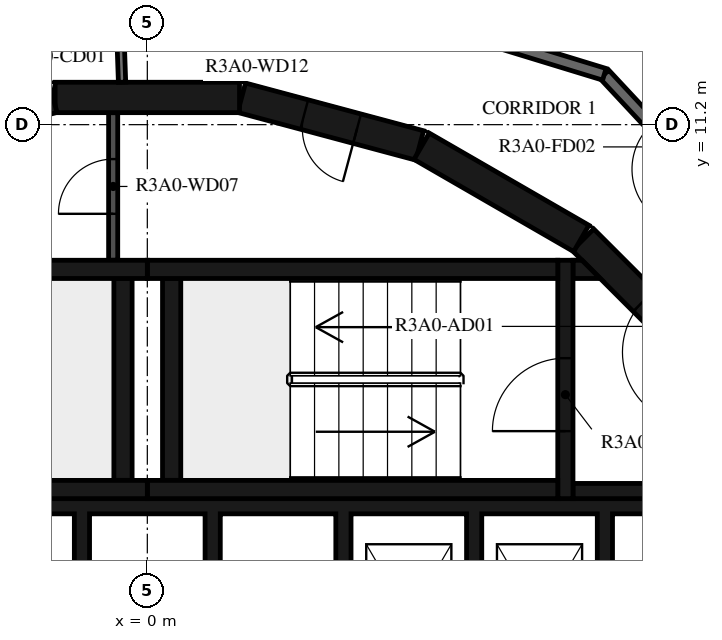
"""IFC4 building model, lengths in metres.
Left out: names, types, materials, properties, quantities, classifications, styles, units other than length and angle.
Written with IfcOpenShell. Run it as: python <this file> out.ifc"""

import sys

from ifc_helpers import new_model, si_unit, direction, frame, frame_2d, origin, place, context, subcontext, project, spatial, polyline, rectangle, outline, extrude, element, fill, save


model = new_model("IFC4")
c1 = context("Model", 3, precision=1e-05, world=origin(), true_north=direction((0.0, 1.0)))
c2 = subcontext(c1, "Body", "Model", "MODEL_VIEW")
j1 = project(units=[si_unit("LENGTHUNIT", "METRE"), si_unit("PLANEANGLEUNIT", "RADIAN")], contexts=[c1])
p1 = place(None, origin())
s1 = spatial("IfcSite", under=j1, at=p1, CompositionType="ELEMENT")
p2 = place(p1, origin())
s2 = spatial("IfcBuilding", under=s1, at=p2, CompositionType="ELEMENT")
p3 = place(p2, frame((0.0, 0.0, 120.4)))
s3 = spatial("IfcBuildingStorey", under=s2, at=p3, CompositionType="ELEMENT", Elevation=120.4)
p4 = place(p3, frame((9.308, 7.164, 0.0), z_axis=(0.0, 0.0, 1.0), x_axis=(-0.707106781187, 0.707106781187, 0.0)))
e1 = element("IfcWall", 1, at=p4, inside=s3, PredefinedType="SHEAR", context=c2, shape_type="SweptSolid", body=[
    extrude(rectangle(XDim=3.032, YDim=0.5, at=frame_2d((1.516, 0.0))), origin(), (0.0, 0.0, 1.0), 3.12),
])
p5 = place(p4, frame((0.416, 0.0, 0.0)))
e2 = element("IfcOpeningElement", 2, at=p5, cuts=e1, PredefinedType="OPENING", context=c2, shape_type="SweptSolid", body=[
    extrude(rectangle(XDim=1.2, YDim=2.1, at=frame_2d((0.6, 1.05))), frame((0.0, 0.26, 0.0), z_axis=(0.0, -1.0, 0.0), x_axis=(1.0, 0.0, 0.0)), (0.0, 0.0, 1.0), 0.52),
])
p6 = place(p3, frame((7.137, 9.329, 0.0), z_axis=(0.0, 0.0, 1.0), x_axis=(-0.865975092491, 0.500087131594, 0.0)))
e3 = element("IfcWall", 3, at=p6, inside=s3, PredefinedType="SHEAR", context=c2, shape_type="SweptSolid", body=[
    extrude(rectangle(XDim=3.033, YDim=0.5, at=frame_2d((1.516, 0.0))), origin(), (0.0, 0.0, 1.0), 3.12),
])
p7 = place(p3, frame((4.479, 10.858, 0.0), z_axis=(0.0, 0.0, 1.0), x_axis=(-0.965948410781, 0.258734743916, 0.0)))
e4 = element("IfcWall", 4, at=p7, inside=s3, PredefinedType="SHEAR", context=c2, shape_type="SweptSolid", body=[
    extrude(rectangle(XDim=3.033, YDim=0.5, at=frame_2d((1.516, 0.0))), origin(), (0.0, 0.0, 1.0), 3.12),
])
p8 = place(p7, frame((1.066, 0.0, 0.0)))
e5 = element("IfcOpeningElement", 5, at=p8, cuts=e4, PredefinedType="OPENING", context=c2, shape_type="SweptSolid", body=[
    extrude(rectangle(XDim=0.9, YDim=2.1, at=frame_2d((0.45, 1.05))), frame((0.0, 0.26, 0.0), z_axis=(0.0, -1.0, 0.0), x_axis=(1.0, 0.0, 0.0)), (0.0, 0.0, 1.0), 0.52),
])
for number, where, z_axis, x_axis in (
    (6, (1.516, 11.647, 0.0), (0.0, 0.0, 1.0), (-1.0, 0.0, 0.0)),
    (7, (-1.55, 11.643, 0.0), (0.0, 0.0, 1.0), (-0.966, -0.259, 0.0)),
):
    element("IfcWall", number, at=place(p3, frame(where, z_axis=z_axis, x_axis=x_axis)), inside=s3, PredefinedType="SHEAR", context=c2, shape_type="SweptSolid", body=[
        extrude(rectangle(XDim=3.033, YDim=0.5, at=frame_2d((1.516, 0.0))), origin(), (0.0, 0.0, 1.0), 3.12),
    ])
for number, where, z_axis, x_axis in (
    (8, (0.0, 5.2, 0.0), (0.0, 0.0, 1.0), (1.0, 0.0, 0.0)),
    (9, (0.0, 8.82, 0.0), (0.0, 0.0, 1.0), (1.0, 0.0, 0.0)),
):
    element("IfcWall", number, at=place(p3, frame(where, z_axis=z_axis, x_axis=x_axis)), inside=s3, PredefinedType="SHEAR", context=c2, shape_type="SweptSolid", body=[
        extrude(rectangle(XDim=6.75, YDim=0.3, at=frame_2d((3.375, 0.0))), origin(), (0.0, 0.0, 1.0), 3.12),
    ])
p9 = place(p3, frame((0.4, 5.35, 0.0), z_axis=(0.0, 0.0, 1.0), x_axis=(0.0, 1.0, 0.0)))
e10 = element("IfcWall", 10, at=p9, inside=s3, PredefinedType="SHEAR", context=c2, shape_type="SweptSolid", body=[
    extrude(rectangle(XDim=3.32, YDim=0.3, at=frame_2d((1.66, 0.0))), origin(), (0.0, 0.0, 1.0), 3.12),
])
p10 = place(p3, frame((6.875, 5.05, 0.0), z_axis=(0.0, 0.0, 1.0), x_axis=(0.0, 1.0, 0.0)))
e11 = element("IfcWall", 11, at=p10, inside=s3, PredefinedType="SHEAR", context=c2, shape_type="SweptSolid", body=[
    extrude(rectangle(XDim=3.92, YDim=0.25, at=frame_2d((1.96, 0.0))), origin(), (0.0, 0.0, 1.0), 3.12),
])
p11 = place(p10, frame((1.11, 0.0, 0.0)))
e12 = element("IfcOpeningElement", 12, at=p11, cuts=e11, PredefinedType="OPENING", context=c2, shape_type="SweptSolid", body=[
    extrude(rectangle(XDim=1.2, YDim=2.1, at=frame_2d((0.6, 1.05))), frame((0.0, 0.135, 0.0), z_axis=(0.0, -1.0, 0.0), x_axis=(1.0, 0.0, 0.0)), (0.0, 0.0, 1.0), 0.27),
])
p12 = place(p3, frame((7.0, 5.175, 0.0), z_axis=(0.0, 0.0, 1.0), x_axis=(1.0, 0.0, 0.0)))
e13 = element("IfcWall", 13, at=p12, inside=s3, PredefinedType="SHEAR", context=c2, shape_type="SweptSolid", body=[
    extrude(rectangle(XDim=3.1, YDim=0.25, at=frame_2d((1.55, 0.0))), origin(), (0.0, 0.0, 1.0), 3.12),
])
p13 = place(p3, origin())
e14 = element("IfcWall", 14, at=p13, inside=s3, PredefinedType="SHEAR", context=c2, shape_type="SweptSolid", body=[
    extrude(outline(polyline([(7.448, 8.67), (7.0, 8.67), (7.0, 8.97), (7.148, 8.97), (7.448, 8.67)])), origin(), (0.0, 0.0, 1.0), 3.12),
])
for number, where, z_axis, x_axis in (
    (15, (-6.75, 5.2, 0.0), (0.0, 0.0, 1.0), (1.0, 0.0, 0.0)),
    (16, (-6.75, 8.82, 0.0), (0.0, 0.0, 1.0), (1.0, 0.0, 0.0)),
):
    element("IfcWall", number, at=place(p3, frame(where, z_axis=z_axis, x_axis=x_axis)), inside=s3, PredefinedType="SHEAR", context=c2, shape_type="SweptSolid", body=[
        extrude(rectangle(XDim=6.75, YDim=0.3, at=frame_2d((3.375, 0.0))), origin(), (0.0, 0.0, 1.0), 3.12),
    ])
p14 = place(p3, frame((-0.4, 5.35, 0.0), z_axis=(0.0, 0.0, 1.0), x_axis=(0.0, 1.0, 0.0)))
e17 = element("IfcWall", 17, at=p14, inside=s3, PredefinedType="SHEAR", context=c2, shape_type="SweptSolid", body=[
    extrude(rectangle(XDim=3.32, YDim=0.3, at=frame_2d((1.66, 0.0))), origin(), (0.0, 0.0, 1.0), 3.12),
])
p15 = place(p3, origin())
e18 = element("IfcWall", 18, at=p15, inside=s3, PredefinedType="SHEAR", context=c2, shape_type="SweptSolid", body=[
    extrude(outline(polyline([(-9.55, 4.8), (-7.65, 4.8), (-7.65, 1.9), (-7.4, 1.9), (-7.4, 4.8), (-5.5, 4.8), (-5.5, 1.9), (-5.25, 1.9), (-5.25, 4.8), (-3.35, 4.8), (-3.35, 1.9), (-3.1, 1.9), (-3.1, 4.8), (-1.2, 4.8), (-1.2, 1.9), (-0.95, 1.9), (-0.95, 4.8), (0.95, 4.8), (0.95, 1.9), (1.2, 1.9), (1.2, 4.8), (3.1, 4.8), (3.1, 1.9), (3.35, 1.9), (3.35, 4.8), (5.25, 4.8), (5.25, 1.9), (5.5, 1.9), (5.5, 4.8), (7.4, 4.8), (7.4, 1.9), (7.65, 1.9), (7.65, 4.8), (9.55, 4.8), (9.55, 1.9), (9.8, 1.9), (9.8, 4.8), (9.8, 5.05), (-9.8, 5.05), (-9.8, 4.8), (-9.8, 1.9), (-9.55, 1.9), (-9.55, 4.8)])), origin(), (0.0, 0.0, 1.0), 3.12),
])
p16 = place(p3, frame((-0.562, 8.97, 0.0), z_axis=(0.0, 0.0, 1.0), x_axis=(0.0, 1.0, 0.0)))
e19 = element("IfcWall", 19, at=p16, inside=s3, PredefinedType="PARTITIONING", context=c2, shape_type="SweptSolid", body=[
    extrude(rectangle(XDim=2.427, YDim=0.15, at=frame_2d((1.214, 0.0))), origin(), (0.0, 0.0, 1.0), 3.12),
])
p17 = place(p16, frame((0.764, 0.0, 0.0)))
e20 = element("IfcOpeningElement", 20, at=p17, cuts=e19, PredefinedType="OPENING", context=c2, shape_type="SweptSolid", body=[
    extrude(rectangle(XDim=0.9, YDim=2.1, at=frame_2d((0.45, 1.05))), frame((0.0, 0.085, 0.0), z_axis=(0.0, -1.0, 0.0), x_axis=(1.0, 0.0, 0.0)), (0.0, 0.0, 1.0), 0.17),
])
p18 = place(p3, frame((-0.487, 13.948, 0.0), z_axis=(0.0, 0.0, 1.0), x_axis=(0.034859752231, -0.999392214135, 0.0)))
e21 = element("IfcWall", 21, at=p18, inside=s3, PredefinedType="PARTITIONING", context=c2, shape_type="SweptSolid", body=[
    extrude(rectangle(XDim=2.052, YDim=0.12, at=frame_2d((1.026, 0.0))), origin(), (0.0, 0.0, 1.0), 3.12),
])
p19 = place(p18, frame((0.125, 0.0, 0.0)))
e22 = element("IfcOpeningElement", 22, at=p19, cuts=e21, PredefinedType="OPENING", context=c2, shape_type="SweptSolid", body=[
    extrude(rectangle(XDim=1.2, YDim=2.1, at=frame_2d((0.6, 1.05))), frame((0.0, 0.07, 0.0), z_axis=(0.0, -1.0, 0.0), x_axis=(1.0, 0.0, 0.0)), (0.0, 0.0, 1.0), 0.14),
])
p20 = place(p3, frame((12.523, 6.659, 0.0), z_axis=(0.0, 0.0, 1.0), x_axis=(-0.682001841105, 0.731350455479, 0.0)))
e23 = element("IfcWall", 23, at=p20, inside=s3, PredefinedType="STANDARD", context=c2, shape_type="SweptSolid", body=[
    extrude(rectangle(XDim=7.342, YDim=0.2, at=frame_2d((3.671, 0.0))), origin(), (0.0, 0.0, 1.0), 3.12),
])
p21 = place(p20, frame((3.0, 0.0, 0.0)))
e24 = element("IfcOpeningElement", 24, at=p21, cuts=e23, PredefinedType="OPENING", context=c2, shape_type="SweptSolid", body=[
    extrude(rectangle(XDim=1.0, YDim=2.1, at=frame_2d((0.5, 1.05))), frame((0.0, 0.11, 0.0), z_axis=(0.0, -1.0, 0.0), x_axis=(1.0, 0.0, 0.0)), (0.0, 0.0, 1.0), 0.22),
])
p22 = place(p20, frame((5.209, 0.0, 0.0)))
e25 = element("IfcOpeningElement", 25, at=p22, cuts=e23, PredefinedType="OPENING", context=c2, shape_type="SweptSolid", body=[
    extrude(rectangle(XDim=1.0, YDim=2.1, at=frame_2d((0.5, 1.05))), frame((0.0, 0.11, 0.0), z_axis=(0.0, -1.0, 0.0), x_axis=(1.0, 0.0, 0.0)), (0.0, 0.0, 1.0), 0.22),
])
p23 = place(p3, frame((7.516, 12.028, 0.0), z_axis=(0.0, 0.0, 1.0), x_axis=(-0.956306642771, 0.292365533182, 0.0)))
e26 = element("IfcWall", 26, at=p23, inside=s3, PredefinedType="STANDARD", context=c2, shape_type="SweptSolid", body=[
    extrude(rectangle(XDim=7.342, YDim=0.2, at=frame_2d((3.671, 0.0))), origin(), (0.0, 0.0, 1.0), 3.12),
])
p24 = place(p3, frame((-1.539, 24.071, 0.0), z_axis=(0.0, 0.0, 1.0), x_axis=(0.68200220595, -0.731350115252, 0.0)))
e27 = element("IfcWall", 27, at=p24, inside=s3, PredefinedType="PARTITIONING", context=c2, shape_type="SweptSolid", body=[
    extrude(rectangle(XDim=17.316, YDim=0.12, at=frame_2d((8.658, 0.0))), origin(), (0.0, 0.0, 1.0), 3.12),
])
p25 = place(p24, frame((3.323, 0.0, 0.0)))
e28 = element("IfcOpeningElement", 28, at=p25, cuts=e27, PredefinedType="OPENING", context=c2, shape_type="SweptSolid", body=[
    extrude(rectangle(XDim=0.9, YDim=2.1, at=frame_2d((0.45, 1.05))), frame((0.0, 0.07, 0.0), z_axis=(0.0, -1.0, 0.0), x_axis=(1.0, 0.0, 0.0)), (0.0, 0.0, 1.0), 0.14),
])
p26 = place(p24, frame((1.417, 0.0, 0.0)))
e29 = element("IfcOpeningElement", 29, at=p26, cuts=e27, PredefinedType="OPENING", context=c2, shape_type="SweptSolid", body=[
    extrude(rectangle(XDim=0.9, YDim=2.1, at=frame_2d((0.45, 1.05))), frame((0.0, 0.07, 0.0), z_axis=(0.0, -1.0, 0.0), x_axis=(1.0, 0.0, 0.0)), (0.0, 0.0, 1.0), 0.14),
])
p27 = place(p11, origin())
e30 = element("IfcDoor", 30, at=p27, inside=s3, OperationType="SINGLE_SWING_LEFT", PredefinedType="DOOR", context=c2, shape_type="SweptSolid", body=[
    extrude(rectangle(XDim=1.2, YDim=2.1, at=frame_2d((0.6, 1.05))), frame((0.0, 0.025, 0.0), z_axis=(0.0, -1.0, 0.0), x_axis=(1.0, 0.0, 0.0)), (0.0, 0.0, 1.0), 0.05),
])
fill(e12, e30)
p28 = place(p5, origin())
e31 = element("IfcDoor", 31, at=p28, inside=s3, OperationType="SINGLE_SWING_RIGHT", PredefinedType="DOOR", context=c2, shape_type="SweptSolid", body=[
    extrude(rectangle(XDim=1.2, YDim=2.1, at=frame_2d((0.6, 1.05))), frame((0.0, 0.025, 0.0), z_axis=(0.0, -1.0, 0.0), x_axis=(1.0, 0.0, 0.0)), (0.0, 0.0, 1.0), 0.05),
])
fill(e2, e31)
p29 = place(p17, origin())
e32 = element("IfcDoor", 32, at=p29, inside=s3, OperationType="SINGLE_SWING_RIGHT", PredefinedType="DOOR", context=c2, shape_type="SweptSolid", body=[
    extrude(rectangle(XDim=0.9, YDim=2.1, at=frame_2d((0.45, 1.05))), frame((0.0, 0.025, 0.0), z_axis=(0.0, -1.0, 0.0), x_axis=(1.0, 0.0, 0.0)), (0.0, 0.0, 1.0), 0.05),
])
fill(e20, e32)
p30 = place(p8, origin())
e33 = element("IfcDoor", 33, at=p30, inside=s3, OperationType="SINGLE_SWING_LEFT", PredefinedType="DOOR", context=c2, shape_type="SweptSolid", body=[
    extrude(rectangle(XDim=0.9, YDim=2.1, at=frame_2d((0.45, 1.05))), frame((0.0, 0.025, 0.0), z_axis=(0.0, -1.0, 0.0), x_axis=(1.0, 0.0, 0.0)), (0.0, 0.0, 1.0), 0.05),
])
fill(e5, e33)
save(model, sys.argv[1])
